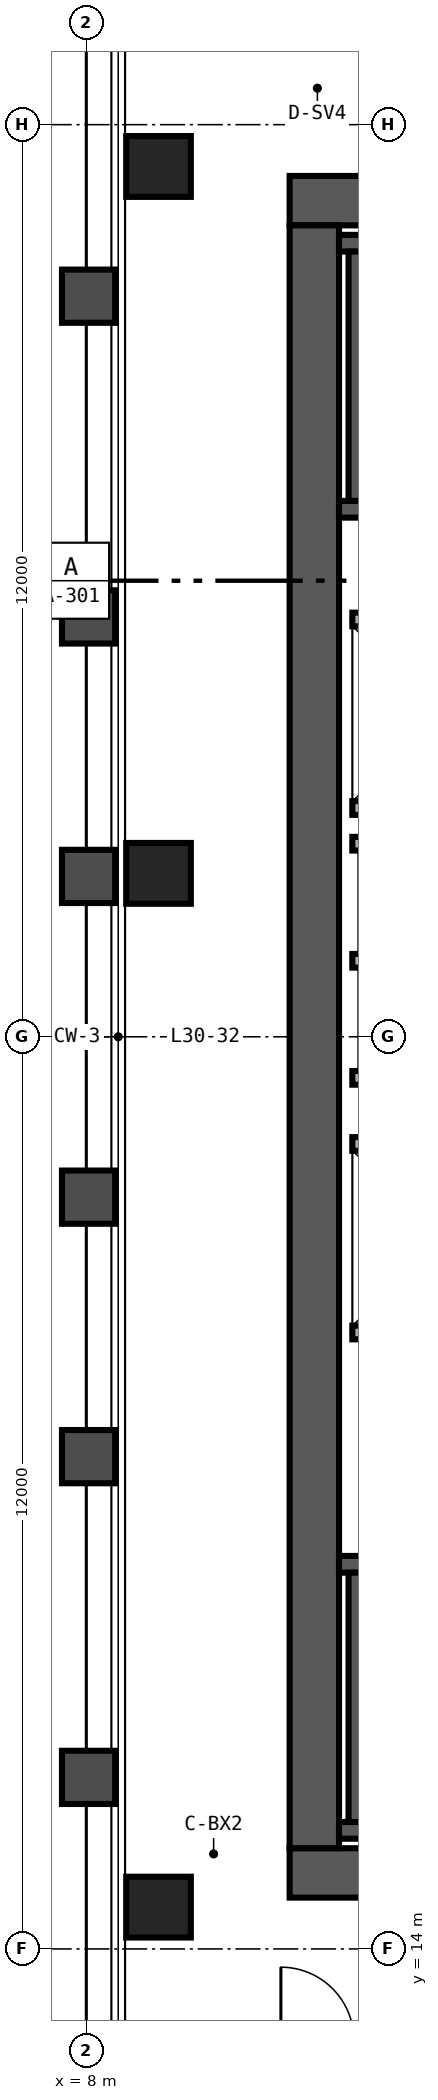
"""IFC4 building model, lengths in metres.
Left out: names, types, materials, properties, quantities, classifications, styles, units other than length and angle.
Written with IfcOpenShell. Run it as: python <this file> out.ifc"""

import sys

from ifc_helpers import new_model, si_unit, direction, frame, frame_2d, origin, origin_2d, place, context, subcontext, project, spatial, rectangle, hollow_rectangle, extrude, source, transform, mapped, element, save


model = new_model("IFC4")
c1 = context("Model", 3, precision=1e-05, world=origin(), true_north=direction((0.0, 1.0)))
c2 = subcontext(c1, "Body", "Model", "MODEL_VIEW")
j1 = project(units=[si_unit("LENGTHUNIT", "METRE"), si_unit("PLANEANGLEUNIT", "RADIAN")], contexts=[c1])
p1 = place(None, origin())
s1 = spatial("IfcSite", under=j1, at=p1, CompositionType="ELEMENT")
p2 = place(p1, origin())
s2 = spatial("IfcBuilding", under=s1, at=p2, CompositionType="ELEMENT")
p3 = place(p2, frame((0.0, 0.0, 122.4)))
s3 = spatial("IfcBuildingStorey", under=s2, at=p3, CompositionType="ELEMENT", Elevation=122.4)
p4 = place(p3, frame((10.675, 15.0, 0.0), z_axis=(0.0, 0.0, 1.0), x_axis=(1.0, 0.0, 0.0)))
e1 = element("IfcWall", 1, at=p4, inside=s3, PredefinedType="SHEAR", context=c2, shape_type="SweptSolid", body=[
    extrude(rectangle(XDim=12.65, YDim=0.65, at=frame_2d((6.325, 0.0))), origin(), (0.0, 0.0, 1.0), 3.36),
])
p5 = place(p4, frame((10.225, 0.0, 0.0)))
e2 = element("IfcOpeningElement", 2, at=p5, cuts=e1, PredefinedType="OPENING", context=c2, shape_type="SweptSolid", body=[
    extrude(rectangle(XDim=1.0, YDim=2.15, at=frame_2d((0.5, 1.075))), frame((0.0, 0.335, 0.0), z_axis=(0.0, -1.0, 0.0), x_axis=(1.0, 0.0, 0.0)), (0.0, 0.0, 1.0), 0.67),
])
p6 = place(p3, frame((10.675, 37.0, 0.0), z_axis=(0.0, 0.0, 1.0), x_axis=(1.0, 0.0, 0.0)))
e3 = element("IfcWall", 3, at=p6, inside=s3, PredefinedType="SHEAR", context=c2, shape_type="SweptSolid", body=[
    extrude(rectangle(XDim=12.65, YDim=0.65, at=frame_2d((6.325, 0.0))), origin(), (0.0, 0.0, 1.0), 3.36),
])
p7 = place(p6, frame((10.425, 0.0, 0.0)))
e4 = element("IfcOpeningElement", 4, at=p7, cuts=e3, PredefinedType="OPENING", context=c2, shape_type="SweptSolid", body=[
    extrude(rectangle(XDim=1.0, YDim=2.15, at=frame_2d((0.5, 1.075))), frame((0.0, 0.335, 0.0), z_axis=(0.0, -1.0, 0.0), x_axis=(1.0, 0.0, 0.0)), (0.0, 0.0, 1.0), 0.67),
])
p8 = place(p3, frame((11.0, 15.325, 0.0), z_axis=(0.0, 0.0, 1.0), x_axis=(0.0, 1.0, 0.0)))
e5 = element("IfcWall", 5, at=p8, inside=s3, PredefinedType="SHEAR", context=c2, shape_type="SweptSolid", body=[
    extrude(rectangle(XDim=21.35, YDim=0.65, at=frame_2d((10.675, 0.0))), origin(), (0.0, 0.0, 1.0), 3.36),
])
p9 = place(p3, frame((11.325, 15.56, 0.0), z_axis=(0.0, 0.0, 1.0), x_axis=(1.0, 0.0, 0.0)))
e6 = element("IfcWall", 6, at=p9, inside=s3, PredefinedType="SHEAR", context=c2, shape_type="SweptSolid", body=[
    extrude(rectangle(XDim=7.985, YDim=0.22, at=frame_2d((3.993, 0.0))), origin(), (0.0, 0.0, 1.0), 3.4),
])
p10 = place(p3, frame((11.325, 19.06, 0.0), z_axis=(0.0, 0.0, 1.0), x_axis=(1.0, 0.0, 0.0)))
e7 = element("IfcWall", 7, at=p10, inside=s3, PredefinedType="SHEAR", context=c2, shape_type="SweptSolid", body=[
    extrude(rectangle(XDim=7.985, YDim=0.22, at=frame_2d((3.993, 0.0))), origin(), (0.0, 0.0, 1.0), 3.4),
])
p11 = place(p10, frame((0.595, 0.0, 0.0)))
e8 = element("IfcOpeningElement", 8, at=p11, cuts=e7, PredefinedType="OPENING", context=c2, shape_type="SweptSolid", body=[
    extrude(rectangle(XDim=1.05, YDim=2.15, at=frame_2d((0.525, 1.075))), frame((0.0, 0.12, 0.0), z_axis=(0.0, -1.0, 0.0), x_axis=(1.0, 0.0, 0.0)), (0.0, 0.0, 1.0), 0.24),
])
p12 = place(p3, frame((11.56, 15.67, 0.0), z_axis=(0.0, 0.0, 1.0), x_axis=(0.0, 1.0, 0.0)))
e9 = element("IfcWall", 9, at=p12, inside=s3, PredefinedType="SHEAR", context=c2, shape_type="SweptSolid", body=[
    extrude(rectangle(XDim=3.28, YDim=0.22, at=frame_2d((1.64, 0.0))), origin(), (0.0, 0.0, 1.0), 3.4),
])
p13 = place(p3, frame((11.325, 32.94, 0.0), z_axis=(0.0, 0.0, 1.0), x_axis=(1.0, 0.0, 0.0)))
e10 = element("IfcWall", 10, at=p13, inside=s3, PredefinedType="SHEAR", context=c2, shape_type="SweptSolid", body=[
    extrude(rectangle(XDim=7.985, YDim=0.22, at=frame_2d((3.993, 0.0))), origin(), (0.0, 0.0, 1.0), 3.4),
])
p14 = place(p13, frame((0.595, 0.0, 0.0)))
e11 = element("IfcOpeningElement", 11, at=p14, cuts=e10, PredefinedType="OPENING", context=c2, shape_type="SweptSolid", body=[
    extrude(rectangle(XDim=1.05, YDim=2.15, at=frame_2d((0.525, 1.075))), frame((0.0, 0.12, 0.0), z_axis=(0.0, -1.0, 0.0), x_axis=(1.0, 0.0, 0.0)), (0.0, 0.0, 1.0), 0.24),
])
p15 = place(p3, frame((11.325, 36.44, 0.0), z_axis=(0.0, 0.0, 1.0), x_axis=(1.0, 0.0, 0.0)))
e12 = element("IfcWall", 12, at=p15, inside=s3, PredefinedType="SHEAR", context=c2, shape_type="SweptSolid", body=[
    extrude(rectangle(XDim=7.985, YDim=0.22, at=frame_2d((3.993, 0.0))), origin(), (0.0, 0.0, 1.0), 3.4),
])
p16 = place(p3, frame((11.56, 33.05, 0.0), z_axis=(0.0, 0.0, 1.0), x_axis=(0.0, 1.0, 0.0)))
e13 = element("IfcWall", 13, at=p16, inside=s3, PredefinedType="SHEAR", context=c2, shape_type="SweptSolid", body=[
    extrude(rectangle(XDim=3.28, YDim=0.22, at=frame_2d((1.64, 0.0))), origin(), (0.0, 0.0, 1.0), 3.4),
])
m1 = source(origin(), c2, "Body", "SweptSolid", [
    extrude(hollow_rectangle(XDim=0.85, YDim=0.8, WallThickness=0.032, at=origin_2d()), origin(), (0.0, 0.0, 1.0), 3.36),
])
for number, where, z_axis, x_axis in (
    (14, (8.95, 14.55, 0.0), (0.0, 0.0, 1.0), (1.0, 0.0, 0.0)),
    (15, (8.95, 28.15, 0.0), (0.0, 0.0, 1.0), (1.0, 0.0, 0.0)),
    (16, (8.95, 37.45, 0.0), (0.0, 0.0, 1.0), (1.0, 0.0, 0.0)),
):
    element("IfcColumn", number, at=place(p3, frame(where, z_axis=z_axis, x_axis=x_axis)), inside=s3, PredefinedType="COLUMN", context=c2, shape_type="MappedRepresentation", body=[
        mapped(m1, transform((0.0, 0.0, 0.0), scale=1.0)),
    ])
for number, where, z_axis, x_axis in (
    (17, (11.5, 22.11, 0.0), (0.0, 0.0, 1.0), (1.0, 0.0, 0.0)),
    (18, (11.5, 24.59, 0.0), (0.0, 0.0, 1.0), (1.0, 0.0, 0.0)),
    (19, (11.5, 29.01, 0.0), (0.0, 0.0, 1.0), (1.0, 0.0, 0.0)),
    (20, (11.5, 31.49, 0.0), (0.0, 0.0, 1.0), (1.0, 0.0, 0.0)),
):
    element("IfcWall", number, at=place(p3, frame(where, z_axis=z_axis, x_axis=x_axis)), inside=s3, PredefinedType="SOLIDWALL", context=c2, shape_type="SweptSolid", body=[
        extrude(rectangle(XDim=2.5, YDim=0.18, at=frame_2d((1.25, 0.0))), origin(), (0.0, 0.0, 1.0), 3.36),
    ])
for number, where, z_axis, x_axis in (
    (21, (11.5, 25.46, 0.0), (0.0, 0.0, 1.0), (1.0, 0.0, 0.0)),
    (22, (11.5, 27.0, 0.0), (0.0, 0.0, 1.0), (1.0, 0.0, 0.0)),
    (23, (11.5, 28.54, 0.0), (0.0, 0.0, 1.0), (1.0, 0.0, 0.0)),
):
    element("IfcWall", number, at=place(p3, frame(where, z_axis=z_axis, x_axis=x_axis)), inside=s3, PredefinedType="SOLIDWALL", context=c2, shape_type="SweptSolid", body=[
        extrude(rectangle(XDim=2.51, YDim=0.18, at=frame_2d((1.255, 0.0))), origin(), (0.0, 0.0, 1.0), 3.36),
    ])
save(model, sys.argv[1])
